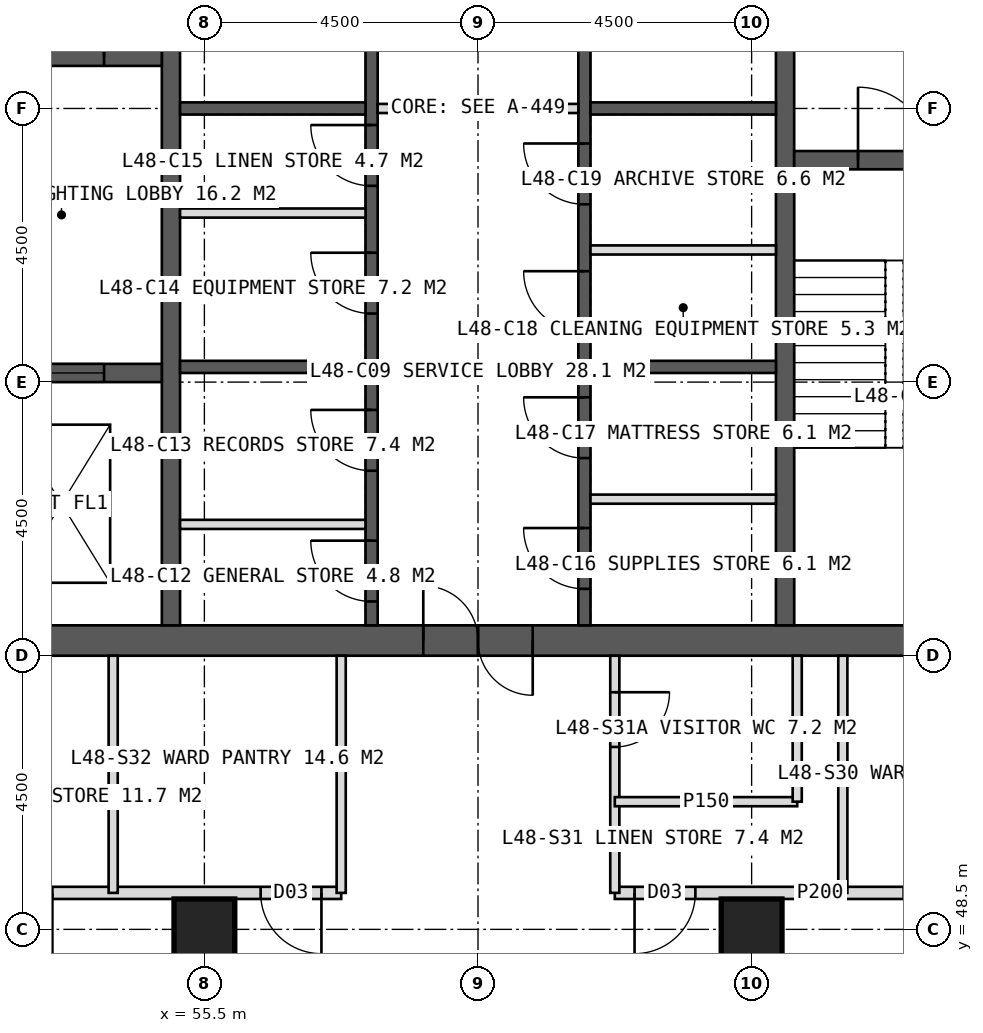
"""IFC4 building model, lengths in metres.
Left out: names, types, materials, properties, quantities, classifications, styles, units other than length and angle.
Written with IfcOpenShell. Run it as: python <this file> out.ifc"""

import sys

from ifc_helpers import new_model, si_unit, direction, frame, frame_2d, origin, origin_2d, place, context, subcontext, project, spatial, rectangle, hollow_rectangle, extrude, element, fill, save


model = new_model("IFC4")
c1 = context("Model", 3, precision=1e-05, world=origin(), true_north=direction((0.0, 1.0)))
c2 = subcontext(c1, "Body", "Model", "MODEL_VIEW")
j1 = project(units=[si_unit("LENGTHUNIT", "METRE"), si_unit("PLANEANGLEUNIT", "RADIAN")], contexts=[c1])
p1 = place(None, origin())
s1 = spatial("IfcSite", under=j1, at=p1, CompositionType="ELEMENT")
p2 = place(p1, origin())
s2 = spatial("IfcBuilding", under=s1, at=p2, CompositionType="ELEMENT")
p3 = place(p2, frame((0.0, 0.0, 201.0)))
s3 = spatial("IfcBuildingStorey", under=s2, at=p3, CompositionType="ELEMENT", Elevation=201.0)
p4 = place(p3, frame((51.0, 53.25, 0.0), z_axis=(0.0, 0.0, 1.0), x_axis=(1.0, 0.0, 0.0)))
e1 = element("IfcWall", 1, at=p4, inside=s3, PredefinedType="SHEAR", context=c2, shape_type="SweptSolid", body=[
    extrude(rectangle(XDim=18.0, YDim=0.5, at=frame_2d((9.0, 0.0))), origin(), (0.0, 0.0, 1.0), 4.0),
])
p5 = place(p4, frame((8.1, 0.0, 0.0)))
e2 = element("IfcOpeningElement", 2, at=p5, cuts=e1, PredefinedType="OPENING", context=c2, shape_type="SweptSolid", body=[
    extrude(rectangle(XDim=1.8, YDim=2.2, at=frame_2d((0.9, 1.1))), frame((0.0, 0.26, 0.0), z_axis=(0.0, -1.0, 0.0), x_axis=(1.0, 0.0, 0.0)), (0.0, 0.0, 1.0), 0.52),
])
for number, where, z_axis, x_axis in (
    (3, (54.95, 53.5, 0.0), (0.0, 0.0, 1.0), (0.0, 1.0, 0.0)),
    (4, (65.05, 53.5, 0.0), (0.0, 0.0, 1.0), (0.0, 1.0, 0.0)),
):
    element("IfcWall", number, at=place(p3, frame(where, z_axis=z_axis, x_axis=x_axis)), inside=s3, PredefinedType="SHEAR", context=c2, shape_type="SweptSolid", body=[
        extrude(rectangle(XDim=17.0, YDim=0.3, at=frame_2d((8.5, 0.0))), origin(), (0.0, 0.0, 1.0), 4.0),
    ])
p6 = place(p3, frame((58.25, 53.5, 0.0), z_axis=(0.0, 0.0, 1.0), x_axis=(0.0, 1.0, 0.0)))
e5 = element("IfcWall", 5, at=p6, inside=s3, PredefinedType="SHEAR", context=c2, shape_type="SweptSolid", body=[
    extrude(rectangle(XDim=17.0, YDim=0.2, at=frame_2d((8.5, 0.0))), origin(), (0.0, 0.0, 1.0), 4.0),
])
p7 = place(p6, frame((0.393, 0.0, 0.0)))
e6 = element("IfcOpeningElement", 6, at=p7, cuts=e5, PredefinedType="OPENING", context=c2, shape_type="SweptSolid", body=[
    extrude(rectangle(XDim=1.0, YDim=2.1, at=frame_2d((0.5, 1.05))), frame((0.0, 0.11, 0.0), z_axis=(0.0, -1.0, 0.0), x_axis=(1.0, 0.0, 0.0)), (0.0, 0.0, 1.0), 0.22),
])
p8 = place(p6, frame((2.542, 0.0, 0.0)))
e7 = element("IfcOpeningElement", 7, at=p8, cuts=e5, PredefinedType="OPENING", context=c2, shape_type="SweptSolid", body=[
    extrude(rectangle(XDim=1.0, YDim=2.1, at=frame_2d((0.5, 1.05))), frame((0.0, 0.11, 0.0), z_axis=(0.0, -1.0, 0.0), x_axis=(1.0, 0.0, 0.0)), (0.0, 0.0, 1.0), 0.22),
])
p9 = place(p6, frame((5.127, 0.0, 0.0)))
e8 = element("IfcOpeningElement", 8, at=p9, cuts=e5, PredefinedType="OPENING", context=c2, shape_type="SweptSolid", body=[
    extrude(rectangle(XDim=1.0, YDim=2.1, at=frame_2d((0.5, 1.05))), frame((0.0, 0.11, 0.0), z_axis=(0.0, -1.0, 0.0), x_axis=(1.0, 0.0, 0.0)), (0.0, 0.0, 1.0), 0.22),
])
p10 = place(p6, frame((7.228, 0.0, 0.0)))
e9 = element("IfcOpeningElement", 9, at=p10, cuts=e5, PredefinedType="OPENING", context=c2, shape_type="SweptSolid", body=[
    extrude(rectangle(XDim=1.0, YDim=2.1, at=frame_2d((0.5, 1.05))), frame((0.0, 0.11, 0.0), z_axis=(0.0, -1.0, 0.0), x_axis=(1.0, 0.0, 0.0)), (0.0, 0.0, 1.0), 0.22),
])
p11 = place(p6, frame((10.025, 0.0, 0.0)))
e10 = element("IfcOpeningElement", 10, at=p11, cuts=e5, PredefinedType="OPENING", context=c2, shape_type="SweptSolid", body=[
    extrude(rectangle(XDim=1.4, YDim=2.2, at=frame_2d((0.7, 1.1))), frame((0.0, 0.11, 0.0), z_axis=(0.0, -1.0, 0.0), x_axis=(1.0, 0.0, 0.0)), (0.0, 0.0, 1.0), 0.22),
])
p12 = place(p6, frame((14.325, 0.0, 0.0)))
e11 = element("IfcOpeningElement", 11, at=p12, cuts=e5, PredefinedType="OPENING", context=c2, shape_type="SweptSolid", body=[
    extrude(rectangle(XDim=1.4, YDim=2.2, at=frame_2d((0.7, 1.1))), frame((0.0, 0.11, 0.0), z_axis=(0.0, -1.0, 0.0), x_axis=(1.0, 0.0, 0.0)), (0.0, 0.0, 1.0), 0.22),
])
p13 = place(p3, frame((61.75, 53.5, 0.0), z_axis=(0.0, 0.0, 1.0), x_axis=(0.0, 1.0, 0.0)))
e12 = element("IfcWall", 12, at=p13, inside=s3, PredefinedType="SHEAR", context=c2, shape_type="SweptSolid", body=[
    extrude(rectangle(XDim=17.0, YDim=0.2, at=frame_2d((8.5, 0.0))), origin(), (0.0, 0.0, 1.0), 4.0),
])
p14 = place(p13, frame((0.6, 0.0, 0.0)))
e13 = element("IfcOpeningElement", 13, at=p14, cuts=e12, PredefinedType="OPENING", context=c2, shape_type="SweptSolid", body=[
    extrude(rectangle(XDim=1.0, YDim=2.1, at=frame_2d((0.5, 1.05))), frame((0.0, 0.11, 0.0), z_axis=(0.0, -1.0, 0.0), x_axis=(1.0, 0.0, 0.0)), (0.0, 0.0, 1.0), 0.22),
])
p15 = place(p13, frame((2.75, 0.0, 0.0)))
e14 = element("IfcOpeningElement", 14, at=p15, cuts=e12, PredefinedType="OPENING", context=c2, shape_type="SweptSolid", body=[
    extrude(rectangle(XDim=1.0, YDim=2.1, at=frame_2d((0.5, 1.05))), frame((0.0, 0.11, 0.0), z_axis=(0.0, -1.0, 0.0), x_axis=(1.0, 0.0, 0.0)), (0.0, 0.0, 1.0), 0.22),
])
p16 = place(p13, frame((4.824, 0.0, 0.0)))
e15 = element("IfcOpeningElement", 15, at=p16, cuts=e12, PredefinedType="OPENING", context=c2, shape_type="SweptSolid", body=[
    extrude(rectangle(XDim=1.0, YDim=2.1, at=frame_2d((0.5, 1.05))), frame((0.0, 0.11, 0.0), z_axis=(0.0, -1.0, 0.0), x_axis=(1.0, 0.0, 0.0)), (0.0, 0.0, 1.0), 0.22),
])
p17 = place(p13, frame((6.924, 0.0, 0.0)))
e16 = element("IfcOpeningElement", 16, at=p17, cuts=e12, PredefinedType="OPENING", context=c2, shape_type="SweptSolid", body=[
    extrude(rectangle(XDim=1.0, YDim=2.1, at=frame_2d((0.5, 1.05))), frame((0.0, 0.11, 0.0), z_axis=(0.0, -1.0, 0.0), x_axis=(1.0, 0.0, 0.0)), (0.0, 0.0, 1.0), 0.22),
])
p18 = place(p13, frame((10.025, 0.0, 0.0)))
e17 = element("IfcOpeningElement", 17, at=p18, cuts=e12, PredefinedType="OPENING", context=c2, shape_type="SweptSolid", body=[
    extrude(rectangle(XDim=1.4, YDim=2.2, at=frame_2d((0.7, 1.1))), frame((0.0, 0.11, 0.0), z_axis=(0.0, -1.0, 0.0), x_axis=(1.0, 0.0, 0.0)), (0.0, 0.0, 1.0), 0.22),
])
p19 = place(p13, frame((14.325, 0.0, 0.0)))
e18 = element("IfcOpeningElement", 18, at=p19, cuts=e12, PredefinedType="OPENING", context=c2, shape_type="SweptSolid", body=[
    extrude(rectangle(XDim=1.4, YDim=2.2, at=frame_2d((0.7, 1.1))), frame((0.0, 0.11, 0.0), z_axis=(0.0, -1.0, 0.0), x_axis=(1.0, 0.0, 0.0)), (0.0, 0.0, 1.0), 0.22),
])
for number, where, z_axis, x_axis in (
    (19, (55.1, 57.75, 0.0), (0.0, 0.0, 1.0), (1.0, 0.0, 0.0)),
    (20, (61.85, 57.75, 0.0), (0.0, 0.0, 1.0), (1.0, 0.0, 0.0)),
    (21, (55.1, 62.0, 0.0), (0.0, 0.0, 1.0), (1.0, 0.0, 0.0)),
    (22, (61.85, 62.0, 0.0), (0.0, 0.0, 1.0), (1.0, 0.0, 0.0)),
):
    element("IfcWall", number, at=place(p3, frame(where, z_axis=z_axis, x_axis=x_axis)), inside=s3, PredefinedType="SHEAR", context=c2, shape_type="SweptSolid", body=[
        extrude(rectangle(XDim=3.05, YDim=0.2, at=frame_2d((1.525, 0.0))), origin(), (0.0, 0.0, 1.0), 4.0),
    ])
p20 = place(p3, frame((51.5, 62.85, 0.0), z_axis=(0.0, 0.0, 1.0), x_axis=(1.0, 0.0, 0.0)))
e23 = element("IfcWall", 23, at=p20, inside=s3, PredefinedType="SHEAR", context=c2, shape_type="SweptSolid", body=[
    extrude(rectangle(XDim=3.3, YDim=0.3, at=frame_2d((1.65, 0.0))), origin(), (0.0, 0.0, 1.0), 4.0),
])
p21 = place(p20, frame((1.15, 0.0, 0.0)))
e24 = element("IfcOpeningElement", 24, at=p21, cuts=e23, PredefinedType="OPENING", context=c2, shape_type="SweptSolid", body=[
    extrude(rectangle(XDim=1.2, YDim=2.1, at=frame_2d((0.6, 1.05))), frame((0.0, 0.16, 0.0), z_axis=(0.0, -1.0, 0.0), x_axis=(1.0, 0.0, 0.0)), (0.0, 0.0, 1.0), 0.32),
])
p22 = place(p3, frame((51.5, 57.65, 0.0), z_axis=(0.0, 0.0, 1.0), x_axis=(1.0, 0.0, 0.0)))
e25 = element("IfcWall", 25, at=p22, inside=s3, PredefinedType="SHEAR", context=c2, shape_type="SweptSolid", body=[
    extrude(rectangle(XDim=3.3, YDim=0.3, at=frame_2d((1.65, 0.0))), origin(), (0.0, 0.0, 1.0), 4.0),
])
p23 = place(p22, frame((1.15, 0.0, 0.0)))
e26 = element("IfcOpeningElement", 26, at=p23, cuts=e25, PredefinedType="OPENING", context=c2, shape_type="SweptSolid", body=[
    extrude(rectangle(XDim=1.2, YDim=2.2, at=frame_2d((0.6, 1.1))), frame((0.0, 0.16, 0.0), z_axis=(0.0, -1.0, 0.0), x_axis=(1.0, 0.0, 0.0)), (0.0, 0.0, 1.0), 0.32),
])
p24 = place(p3, frame((65.2, 61.15, 0.0), z_axis=(0.0, 0.0, 1.0), x_axis=(1.0, 0.0, 0.0)))
e27 = element("IfcWall", 27, at=p24, inside=s3, PredefinedType="SHEAR", context=c2, shape_type="SweptSolid", body=[
    extrude(rectangle(XDim=3.3, YDim=0.3, at=frame_2d((1.65, 0.0))), origin(), (0.0, 0.0, 1.0), 4.0),
])
p25 = place(p24, frame((1.05, 0.0, 0.0)))
e28 = element("IfcOpeningElement", 28, at=p25, cuts=e27, PredefinedType="OPENING", context=c2, shape_type="SweptSolid", body=[
    extrude(rectangle(XDim=1.2, YDim=2.1, at=frame_2d((0.6, 1.05))), frame((0.0, 0.16, 0.0), z_axis=(0.0, -1.0, 0.0), x_axis=(1.0, 0.0, 0.0)), (0.0, 0.0, 1.0), 0.32),
])
for number, where, z_axis, x_axis in (
    (29, (55.5, 48.5, 0.0), (0.0, 0.0, 1.0), (1.0, 0.0, 0.0)),
    (30, (64.5, 48.5, 0.0), (0.0, 0.0, 1.0), (1.0, 0.0, 0.0)),
):
    element("IfcColumn", number, at=place(p3, frame(where, z_axis=z_axis, x_axis=x_axis)), inside=s3, PredefinedType="COLUMN", context=c2, shape_type="SweptSolid", body=[
        extrude(hollow_rectangle(XDim=1.0, YDim=1.0, WallThickness=0.1, at=origin_2d()), origin(), (0.0, 0.0, 1.0), 4.0),
    ])
p26 = place(p3, frame((69.0, 49.1, 0.0), z_axis=(0.0, 0.0, 1.0), x_axis=(-1.0, 0.0, 0.0)))
e31 = element("IfcWall", 31, at=p26, inside=s3, PredefinedType="PARTITIONING", context=c2, shape_type="SweptSolid", body=[
    extrude(rectangle(XDim=6.75, YDim=0.2, at=frame_2d((3.375, 0.0))), origin(), (0.0, 0.0, 1.0), 3.75),
])
p27 = place(p26, frame((1.0, 0.0, 0.0)))
e32 = element("IfcOpeningElement", 32, at=p27, cuts=e31, PredefinedType="OPENING", context=c2, shape_type="SweptSolid", body=[
    extrude(rectangle(XDim=1.0, YDim=2.1, at=frame_2d((0.5, 1.05))), frame((0.0, 0.11, 0.0), z_axis=(0.0, -1.0, 0.0), x_axis=(1.0, 0.0, 0.0)), (0.0, 0.0, 1.0), 0.22),
])
p28 = place(p26, frame((5.425, 0.0, 0.0)))
e33 = element("IfcOpeningElement", 33, at=p28, cuts=e31, PredefinedType="OPENING", context=c2, shape_type="SweptSolid", body=[
    extrude(rectangle(XDim=1.0, YDim=2.1, at=frame_2d((0.5, 1.05))), frame((0.0, 0.11, 0.0), z_axis=(0.0, -1.0, 0.0), x_axis=(1.0, 0.0, 0.0)), (0.0, 0.0, 1.0), 0.22),
])
p29 = place(p3, frame((57.75, 49.1, 0.0), z_axis=(0.0, 0.0, 1.0), x_axis=(-1.0, 0.0, 0.0)))
e34 = element("IfcWall", 34, at=p29, inside=s3, PredefinedType="PARTITIONING", context=c2, shape_type="SweptSolid", body=[
    extrude(rectangle(XDim=12.45, YDim=0.2, at=frame_2d((6.225, 0.0))), origin(), (0.0, 0.0, 1.0), 3.75),
])
p30 = place(p29, frame((0.325, 0.0, 0.0)))
e35 = element("IfcOpeningElement", 35, at=p30, cuts=e34, PredefinedType="OPENING", context=c2, shape_type="SweptSolid", body=[
    extrude(rectangle(XDim=1.0, YDim=2.1, at=frame_2d((0.5, 1.05))), frame((0.0, 0.11, 0.0), z_axis=(0.0, -1.0, 0.0), x_axis=(1.0, 0.0, 0.0)), (0.0, 0.0, 1.0), 0.22),
])
p31 = place(p29, frame((4.75, 0.0, 0.0)))
e36 = element("IfcOpeningElement", 36, at=p31, cuts=e34, PredefinedType="OPENING", context=c2, shape_type="SweptSolid", body=[
    extrude(rectangle(XDim=1.0, YDim=2.1, at=frame_2d((0.5, 1.05))), frame((0.0, 0.11, 0.0), z_axis=(0.0, -1.0, 0.0), x_axis=(1.0, 0.0, 0.0)), (0.0, 0.0, 1.0), 0.22),
])
p32 = place(p29, frame((9.1, 0.0, 0.0)))
e37 = element("IfcOpeningElement", 37, at=p32, cuts=e34, PredefinedType="OPENING", context=c2, shape_type="SweptSolid", body=[
    extrude(rectangle(XDim=1.0, YDim=2.1, at=frame_2d((0.5, 1.05))), frame((0.0, 0.11, 0.0), z_axis=(0.0, -1.0, 0.0), x_axis=(1.0, 0.0, 0.0)), (0.0, 0.0, 1.0), 0.22),
])
p33 = place(p3, frame((62.25, 53.0, 0.0), z_axis=(0.0, 0.0, 1.0), x_axis=(0.0, -1.0, 0.0)))
e38 = element("IfcWall", 38, at=p33, inside=s3, PredefinedType="PARTITIONING", context=c2, shape_type="SweptSolid", body=[
    extrude(rectangle(XDim=3.9, YDim=0.15, at=frame_2d((1.95, 0.0))), origin(), (0.0, 0.0, 1.0), 3.75),
])
p34 = place(p33, frame((0.6, 0.0, 0.0)))
e39 = element("IfcOpeningElement", 39, at=p34, cuts=e38, PredefinedType="OPENING", context=c2, shape_type="SweptSolid", body=[
    extrude(rectangle(XDim=0.9, YDim=2.1, at=frame_2d((0.45, 1.05))), frame((0.0, 0.085, 0.0), z_axis=(0.0, -1.0, 0.0), x_axis=(1.0, 0.0, 0.0)), (0.0, 0.0, 1.0), 0.17),
])
for number, where, z_axis, x_axis in (
    (40, (57.75, 53.0, 0.0), (0.0, 0.0, 1.0), (0.0, -1.0, 0.0)),
    (41, (66.0, 53.0, 0.0), (0.0, 0.0, 1.0), (0.0, -1.0, 0.0)),
    (42, (54.0, 53.0, 0.0), (0.0, 0.0, 1.0), (0.0, -1.0, 0.0)),
):
    element("IfcWall", number, at=place(p3, frame(where, z_axis=z_axis, x_axis=x_axis)), inside=s3, PredefinedType="PARTITIONING", context=c2, shape_type="SweptSolid", body=[
        extrude(rectangle(XDim=3.9, YDim=0.15, at=frame_2d((1.95, 0.0))), origin(), (0.0, 0.0, 1.0), 3.75),
    ])
p35 = place(p3, frame((65.25, 50.6, 0.0), z_axis=(0.0, 0.0, 1.0), x_axis=(-1.0, 0.0, 0.0)))
e43 = element("IfcWall", 43, at=p35, inside=s3, PredefinedType="PARTITIONING", context=c2, shape_type="SweptSolid", body=[
    extrude(rectangle(XDim=3.0, YDim=0.15, at=frame_2d((1.5, 0.0))), origin(), (0.0, 0.0, 1.0), 3.75),
])
p36 = place(p3, frame((65.25, 53.0, 0.0), z_axis=(0.0, 0.0, 1.0), x_axis=(0.0, -1.0, 0.0)))
e44 = element("IfcWall", 44, at=p36, inside=s3, PredefinedType="PARTITIONING", context=c2, shape_type="SweptSolid", body=[
    extrude(rectangle(XDim=2.4, YDim=0.15, at=frame_2d((1.2, 0.0))), origin(), (0.0, 0.0, 1.0), 3.75),
])
for number, where, z_axis, x_axis in (
    (45, (55.1, 55.16, 0.0), (0.0, 0.0, 1.0), (1.0, 0.0, 0.0)),
    (46, (61.85, 55.575, 0.0), (0.0, 0.0, 1.0), (1.0, 0.0, 0.0)),
    (47, (55.1, 60.28, 0.0), (0.0, 0.0, 1.0), (1.0, 0.0, 0.0)),
    (48, (61.85, 59.673, 0.0), (0.0, 0.0, 1.0), (1.0, 0.0, 0.0)),
):
    element("IfcWall", number, at=place(p3, frame(where, z_axis=z_axis, x_axis=x_axis)), inside=s3, PredefinedType="PARTITIONING", context=c2, shape_type="SweptSolid", body=[
        extrude(rectangle(XDim=3.05, YDim=0.15, at=frame_2d((1.525, 0.0))), origin(), (0.0, 0.0, 1.0), 3.75),
    ])
p37 = place(p3, frame((58.35, 62.0, 0.0), z_axis=(0.0, 0.0, 1.0), x_axis=(1.0, 0.0, 0.0)))
e49 = element("IfcWall", 49, at=p37, inside=s3, PredefinedType="PARTITIONING", context=c2, shape_type="SweptSolid", body=[
    extrude(rectangle(XDim=3.3, YDim=0.15, at=frame_2d((1.65, 0.0))), origin(), (0.0, 0.0, 1.0), 3.75),
])
p38 = place(p34, origin())
e50 = element("IfcDoor", 50, at=p38, inside=s3, OperationType="SINGLE_SWING_LEFT", PredefinedType="DOOR", context=c2, shape_type="SweptSolid", body=[
    extrude(rectangle(XDim=0.9, YDim=2.1, at=frame_2d((0.45, 1.05))), frame((0.0, 0.025, 0.0), z_axis=(0.0, -1.0, 0.0), x_axis=(1.0, 0.0, 0.0)), (0.0, 0.0, 1.0), 0.05),
])
fill(e39, e50)
p39 = place(p28, origin())
e51 = element("IfcDoor", 51, at=p39, inside=s3, OperationType="SINGLE_SWING_RIGHT", PredefinedType="DOOR", context=c2, shape_type="SweptSolid", body=[
    extrude(rectangle(XDim=1.0, YDim=2.1, at=frame_2d((0.5, 1.05))), frame((0.0, 0.025, 0.0), z_axis=(0.0, -1.0, 0.0), x_axis=(1.0, 0.0, 0.0)), (0.0, 0.0, 1.0), 0.05),
])
fill(e33, e51)
p40 = place(p30, origin())
e52 = element("IfcDoor", 52, at=p40, inside=s3, OperationType="SINGLE_SWING_LEFT", PredefinedType="DOOR", context=c2, shape_type="SweptSolid", body=[
    extrude(rectangle(XDim=1.0, YDim=2.1, at=frame_2d((0.5, 1.05))), frame((0.0, 0.025, 0.0), z_axis=(0.0, -1.0, 0.0), x_axis=(1.0, 0.0, 0.0)), (0.0, 0.0, 1.0), 0.05),
])
fill(e35, e52)
p41 = place(p21, origin())
e53 = element("IfcDoor", 53, at=p41, inside=s3, OperationType="SINGLE_SWING_RIGHT", PredefinedType="DOOR", context=c2, shape_type="SweptSolid", body=[
    extrude(rectangle(XDim=1.2, YDim=2.1, at=frame_2d((0.6, 1.05))), frame((0.0, 0.025, 0.0), z_axis=(0.0, -1.0, 0.0), x_axis=(1.0, 0.0, 0.0)), (0.0, 0.0, 1.0), 0.05),
])
fill(e24, e53)
p42 = place(p25, origin())
e54 = element("IfcDoor", 54, at=p42, inside=s3, OperationType="SINGLE_SWING_LEFT", PredefinedType="DOOR", context=c2, shape_type="SweptSolid", body=[
    extrude(rectangle(XDim=1.2, YDim=2.1, at=frame_2d((0.6, 1.05))), frame((0.0, 0.025, 0.0), z_axis=(0.0, -1.0, 0.0), x_axis=(1.0, 0.0, 0.0)), (0.0, 0.0, 1.0), 0.05),
])
fill(e28, e54)
p43 = place(p23, origin())
e55 = element("IfcDoor", 55, at=p43, inside=s3, OperationType="SLIDING_TO_LEFT", PredefinedType="DOOR", context=c2, shape_type="SweptSolid", body=[
    extrude(rectangle(XDim=1.2, YDim=2.2, at=frame_2d((0.6, 1.1))), frame((0.0, 0.025, 0.0), z_axis=(0.0, -1.0, 0.0), x_axis=(1.0, 0.0, 0.0)), (0.0, 0.0, 1.0), 0.05),
])
fill(e26, e55)
p44 = place(p7, origin())
e56 = element("IfcDoor", 56, at=p44, inside=s3, OperationType="SINGLE_SWING_RIGHT", PredefinedType="DOOR", context=c2, shape_type="SweptSolid", body=[
    extrude(rectangle(XDim=1.0, YDim=2.1, at=frame_2d((0.5, 1.05))), frame((0.0, 0.025, 0.0), z_axis=(0.0, -1.0, 0.0), x_axis=(1.0, 0.0, 0.0)), (0.0, 0.0, 1.0), 0.05),
])
fill(e6, e56)
p45 = place(p8, origin())
e57 = element("IfcDoor", 57, at=p45, inside=s3, OperationType="SINGLE_SWING_RIGHT", PredefinedType="DOOR", context=c2, shape_type="SweptSolid", body=[
    extrude(rectangle(XDim=1.0, YDim=2.1, at=frame_2d((0.5, 1.05))), frame((0.0, 0.025, 0.0), z_axis=(0.0, -1.0, 0.0), x_axis=(1.0, 0.0, 0.0)), (0.0, 0.0, 1.0), 0.05),
])
fill(e7, e57)
p46 = place(p14, origin())
e58 = element("IfcDoor", 58, at=p46, inside=s3, OperationType="SINGLE_SWING_RIGHT", PredefinedType="DOOR", context=c2, shape_type="SweptSolid", body=[
    extrude(rectangle(XDim=1.0, YDim=2.1, at=frame_2d((0.5, 1.05))), frame((0.0, 0.025, 0.0), z_axis=(0.0, -1.0, 0.0), x_axis=(1.0, 0.0, 0.0)), (0.0, 0.0, 1.0), 0.05),
])
fill(e13, e58)
p47 = place(p15, origin())
e59 = element("IfcDoor", 59, at=p47, inside=s3, OperationType="SINGLE_SWING_RIGHT", PredefinedType="DOOR", context=c2, shape_type="SweptSolid", body=[
    extrude(rectangle(XDim=1.0, YDim=2.1, at=frame_2d((0.5, 1.05))), frame((0.0, 0.025, 0.0), z_axis=(0.0, -1.0, 0.0), x_axis=(1.0, 0.0, 0.0)), (0.0, 0.0, 1.0), 0.05),
])
fill(e14, e59)
p48 = place(p9, origin())
e60 = element("IfcDoor", 60, at=p48, inside=s3, OperationType="SINGLE_SWING_RIGHT", PredefinedType="DOOR", context=c2, shape_type="SweptSolid", body=[
    extrude(rectangle(XDim=1.0, YDim=2.1, at=frame_2d((0.5, 1.05))), frame((0.0, 0.025, 0.0), z_axis=(0.0, -1.0, 0.0), x_axis=(1.0, 0.0, 0.0)), (0.0, 0.0, 1.0), 0.05),
])
fill(e8, e60)
p49 = place(p10, origin())
e61 = element("IfcDoor", 61, at=p49, inside=s3, OperationType="SINGLE_SWING_RIGHT", PredefinedType="DOOR", context=c2, shape_type="SweptSolid", body=[
    extrude(rectangle(XDim=1.0, YDim=2.1, at=frame_2d((0.5, 1.05))), frame((0.0, 0.025, 0.0), z_axis=(0.0, -1.0, 0.0), x_axis=(1.0, 0.0, 0.0)), (0.0, 0.0, 1.0), 0.05),
])
fill(e9, e61)
p50 = place(p16, origin())
e62 = element("IfcDoor", 62, at=p50, inside=s3, OperationType="SINGLE_SWING_RIGHT", PredefinedType="DOOR", context=c2, shape_type="SweptSolid", body=[
    extrude(rectangle(XDim=1.0, YDim=2.1, at=frame_2d((0.5, 1.05))), frame((0.0, 0.025, 0.0), z_axis=(0.0, -1.0, 0.0), x_axis=(1.0, 0.0, 0.0)), (0.0, 0.0, 1.0), 0.05),
])
fill(e15, e62)
p51 = place(p17, origin())
e63 = element("IfcDoor", 63, at=p51, inside=s3, OperationType="SINGLE_SWING_RIGHT", PredefinedType="DOOR", context=c2, shape_type="SweptSolid", body=[
    extrude(rectangle(XDim=1.0, YDim=2.1, at=frame_2d((0.5, 1.05))), frame((0.0, 0.025, 0.0), z_axis=(0.0, -1.0, 0.0), x_axis=(1.0, 0.0, 0.0)), (0.0, 0.0, 1.0), 0.05),
])
fill(e16, e63)
p52 = place(p5, origin())
e64 = element("IfcDoor", 64, at=p52, inside=s3, OperationType="DOUBLE_DOOR_SINGLE_SWING", PredefinedType="DOOR", context=c2, shape_type="SweptSolid", body=[
    extrude(rectangle(XDim=1.8, YDim=2.2, at=frame_2d((0.9, 1.1))), frame((0.0, 0.025, 0.0), z_axis=(0.0, -1.0, 0.0), x_axis=(1.0, 0.0, 0.0)), (0.0, 0.0, 1.0), 0.05),
])
fill(e2, e64)
save(model, sys.argv[1])
